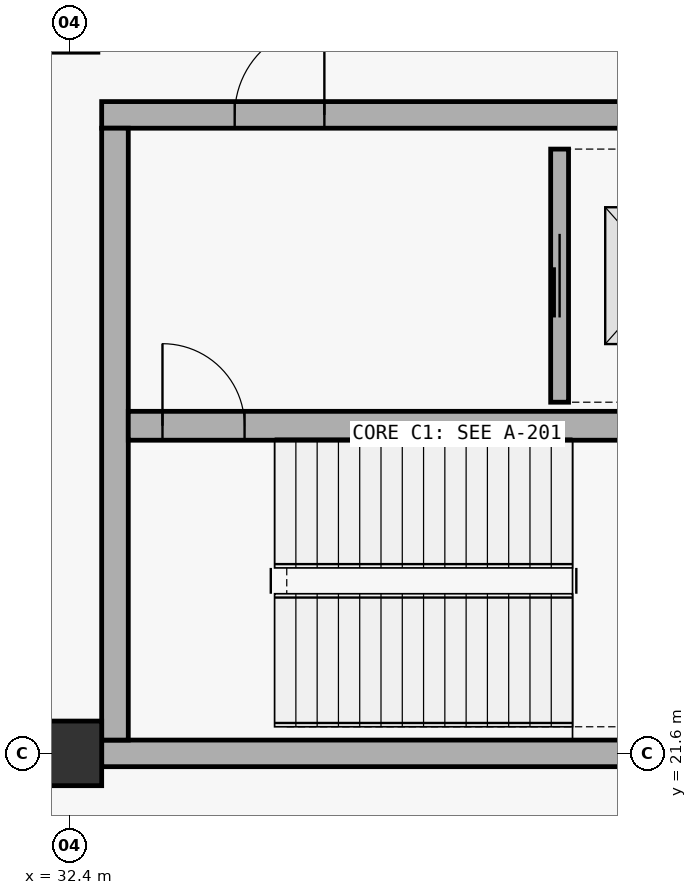
"""IFC4 building model, lengths in metres.
Left out: names, types, materials, properties, quantities, classifications, styles, units other than length and angle.
Written with IfcOpenShell. Run it as: python <this file> out.ifc"""

import sys

from ifc_helpers import new_model, si_unit, direction, frame, frame_2d, origin, origin_2d, place, context, subcontext, project, spatial, rectangle, extrude, element, fill, save


model = new_model("IFC4")
c1 = context("Model", 3, precision=1e-05, world=origin(), true_north=direction((0.0, 1.0)))
c2 = subcontext(c1, "Body", "Model", "MODEL_VIEW")
j1 = project(units=[si_unit("LENGTHUNIT", "METRE"), si_unit("PLANEANGLEUNIT", "RADIAN")], contexts=[c1])
p1 = place(None, origin())
s1 = spatial("IfcSite", under=j1, at=p1, CompositionType="ELEMENT")
p2 = place(p1, origin())
s2 = spatial("IfcBuilding", under=s1, at=p2, CompositionType="ELEMENT")
p3 = place(p2, frame((0.0, 0.0, 10.5)))
s3 = spatial("IfcBuildingStorey", under=s2, at=p3, CompositionType="ELEMENT", Elevation=10.5)
p4 = place(p3, frame((32.4, 21.6, 0.0), z_axis=(0.0, 0.0, 1.0), x_axis=(1.0, 0.0, 0.0)))
e1 = element("IfcColumn", 1, at=p4, inside=s3, PredefinedType="COLUMN", context=c2, shape_type="SweptSolid", body=[
    extrude(rectangle(XDim=0.85, YDim=0.85, at=origin_2d()), origin(), (0.0, 0.0, 1.0), 5.1),
])
p5 = place(p3, frame((32.825, 21.6, 0.0), z_axis=(0.0, 0.0, 1.0), x_axis=(1.0, 0.0, 0.0)))
e2 = element("IfcWall", 2, at=p5, inside=s3, PredefinedType="SHEAR", context=c2, shape_type="SweptSolid", body=[
    extrude(rectangle(XDim=9.35, YDim=0.35, at=frame_2d((4.675, 0.0))), origin(), (0.0, 0.0, 1.0), 5.1),
])
p6 = place(p3, frame((32.825, 30.0, 0.0), z_axis=(0.0, 0.0, 1.0), x_axis=(1.0, 0.0, 0.0)))
e3 = element("IfcWall", 3, at=p6, inside=s3, PredefinedType="SHEAR", context=c2, shape_type="SweptSolid", body=[
    extrude(rectangle(XDim=9.35, YDim=0.35, at=frame_2d((4.675, 0.0))), origin(), (0.0, 0.0, 1.0), 5.1),
])
p7 = place(p6, frame((1.75, 0.0, 0.0)))
e4 = element("IfcOpeningElement", 4, at=p7, cuts=e3, PredefinedType="OPENING", context=c2, shape_type="SweptSolid", body=[
    extrude(rectangle(XDim=1.18, YDim=2.24, at=frame_2d((0.59, 1.12))), frame((0.0, 0.185, 0.0), z_axis=(0.0, -1.0, 0.0), x_axis=(1.0, 0.0, 0.0)), (0.0, 0.0, 1.0), 0.37),
])
p8 = place(p3, frame((33.0, 21.775, 0.0), z_axis=(0.0, 0.0, 1.0), x_axis=(0.0, 1.0, 0.0)))
e5 = element("IfcWall", 5, at=p8, inside=s3, PredefinedType="SHEAR", context=c2, shape_type="SweptSolid", body=[
    extrude(rectangle(XDim=8.05, YDim=0.35, at=frame_2d((4.025, 0.0))), origin(), (0.0, 0.0, 1.0), 5.1),
])
p9 = place(p3, frame((33.175, 25.91, 0.0), z_axis=(0.0, 0.0, 1.0), x_axis=(1.0, 0.0, 0.0)))
e6 = element("IfcWall", 6, at=p9, inside=s3, PredefinedType="SHEAR", context=c2, shape_type="SweptSolid", body=[
    extrude(rectangle(XDim=8.65, YDim=0.38, at=frame_2d((4.325, 0.0))), origin(), (0.0, 0.0, 1.0), 5.1),
])
p10 = place(p9, frame((0.45, 0.0, 0.0)))
e7 = element("IfcOpeningElement", 7, at=p10, cuts=e6, PredefinedType="OPENING", context=c2, shape_type="SweptSolid", body=[
    extrude(rectangle(XDim=1.08, YDim=2.18, at=frame_2d((0.54, 1.09))), frame((0.0, 0.2, 0.0), z_axis=(0.0, -1.0, 0.0), x_axis=(1.0, 0.0, 0.0)), (0.0, 0.0, 1.0), 0.4),
])
p11 = place(p3, frame((38.85, 26.22, 0.0), z_axis=(0.0, 0.0, 1.0), x_axis=(0.0, 1.0, 0.0)))
e8 = element("IfcWall", 8, at=p11, inside=s3, PredefinedType="PARTITIONING", context=c2, shape_type="SweptSolid", body=[
    extrude(rectangle(XDim=3.33, YDim=0.235, at=frame_2d((1.665, 0.0))), origin(), (0.0, 0.0, 1.0), 4.72),
])
p12 = place(p11, frame((1.115, 0.0, 0.0)))
e9 = element("IfcOpeningElement", 9, at=p12, cuts=e8, PredefinedType="OPENING", context=c2, shape_type="SweptSolid", body=[
    extrude(rectangle(XDim=1.1, YDim=2.2, at=frame_2d((0.55, 1.1))), frame((0.0, 0.127, 0.0), z_axis=(0.0, -1.0, 0.0), x_axis=(1.0, 0.0, 0.0)), (0.0, 0.0, 1.0), 0.255),
])
p13 = place(p10, origin())
e10 = element("IfcDoor", 10, at=p13, inside=s3, OperationType="SINGLE_SWING_LEFT", PredefinedType="DOOR", context=c2, shape_type="SweptSolid", body=[
    extrude(rectangle(XDim=1.08, YDim=2.18, at=frame_2d((0.54, 1.09))), frame((0.0, 0.025, 0.0), z_axis=(0.0, -1.0, 0.0), x_axis=(1.0, 0.0, 0.0)), (0.0, 0.0, 1.0), 0.05),
])
fill(e7, e10)
p14 = place(p7, origin())
e11 = element("IfcDoor", 11, at=p14, inside=s3, OperationType="SINGLE_SWING_RIGHT", PredefinedType="DOOR", context=c2, shape_type="SweptSolid", body=[
    extrude(rectangle(XDim=1.18, YDim=2.24, at=frame_2d((0.59, 1.12))), frame((0.0, 0.025, 0.0), z_axis=(0.0, -1.0, 0.0), x_axis=(1.0, 0.0, 0.0)), (0.0, 0.0, 1.0), 0.05),
])
fill(e4, e11)
p15 = place(p12, origin())
e12 = element("IfcDoor", 12, at=p15, inside=s3, OperationType="SLIDING_TO_LEFT", PredefinedType="DOOR", context=c2, shape_type="SweptSolid", body=[
    extrude(rectangle(XDim=1.1, YDim=2.2, at=frame_2d((0.55, 1.1))), frame((0.0, 0.025, 0.0), z_axis=(0.0, -1.0, 0.0), x_axis=(1.0, 0.0, 0.0)), (0.0, 0.0, 1.0), 0.05),
])
fill(e9, e12)
save(model, sys.argv[1])
